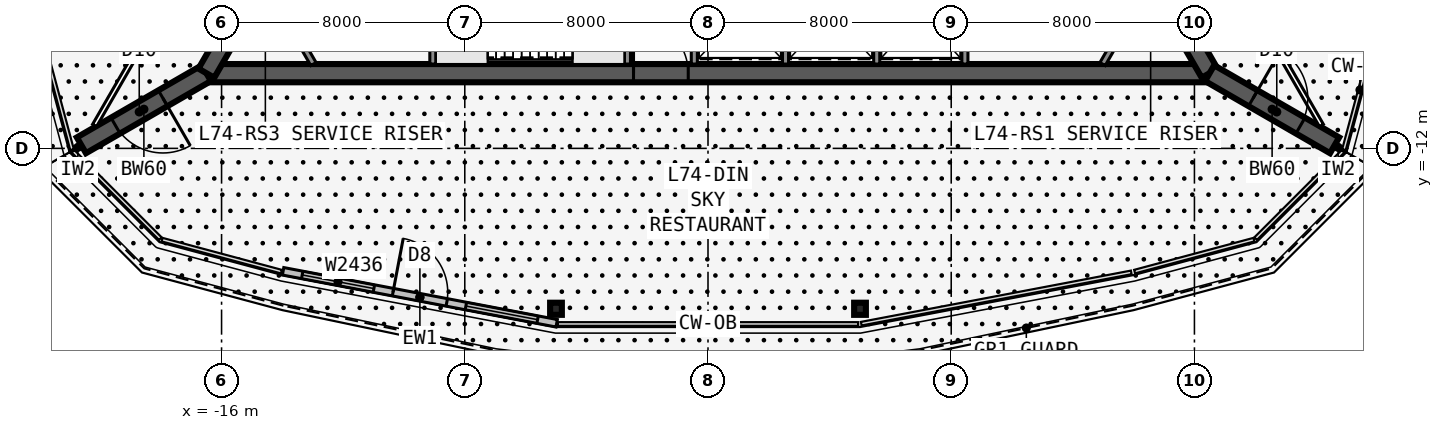
"""IFC4 building model, lengths in metres.
Left out: names, types, materials, properties, quantities, classifications, styles, units other than length and angle.
Written with IfcOpenShell. Run it as: python <this file> out.ifc"""

import sys

from ifc_helpers import new_model, si_unit, direction, frame, frame_2d, origin, origin_2d, place, context, subcontext, project, spatial, rectangle, i_section, extrude, element, fill, save


model = new_model("IFC4")
c1 = context("Model", 3, precision=1e-05, world=origin(), true_north=direction((0.0, 1.0)))
c2 = subcontext(c1, "Body", "Model", "MODEL_VIEW")
j1 = project(units=[si_unit("LENGTHUNIT", "METRE"), si_unit("PLANEANGLEUNIT", "RADIAN")], contexts=[c1])
p1 = place(None, origin())
s1 = spatial("IfcSite", under=j1, at=p1, CompositionType="ELEMENT")
p2 = place(p1, origin())
s2 = spatial("IfcBuilding", under=s1, at=p2, CompositionType="ELEMENT")
p3 = place(p2, frame((0.0, 0.0, 281.3)))
s3 = spatial("IfcBuildingStorey", under=s2, at=p3, CompositionType="ELEMENT", Elevation=281.3)
p4 = place(p3, frame((-16.5, -9.526, 0.0), z_axis=(0.0, 0.0, 1.0), x_axis=(1.0, 0.0, 0.0)))
e1 = element("IfcWall", 1, at=p4, inside=s3, PredefinedType="SHEAR", context=c2, shape_type="SweptSolid", body=[
    extrude(rectangle(XDim=33.0, YDim=0.6, at=frame_2d((16.5, 0.0))), origin(), (0.0, 0.0, 1.0), 5.5),
])
p5 = place(p4, frame((14.05, 0.0, 0.0)))
e2 = element("IfcOpeningElement", 2, at=p5, cuts=e1, PredefinedType="OPENING", context=c2, shape_type="SweptSolid", body=[
    extrude(rectangle(XDim=1.8, YDim=2.13, at=frame_2d((0.9, 1.065))), frame((0.0, 0.31, 0.0), z_axis=(0.0, -1.0, 0.0), x_axis=(1.0, 0.0, 0.0)), (0.0, 0.0, 1.0), 0.62),
])
p6 = place(p3, frame((-9.05, -5.951, 0.0), z_axis=(0.0, 0.0, 1.0), x_axis=(0.0, -1.0, 0.0)))
e3 = element("IfcWall", 3, at=p6, inside=s3, PredefinedType="SOLIDWALL", context=c2, shape_type="SweptSolid", body=[
    extrude(rectangle(XDim=3.275, YDim=0.2, at=frame_2d((1.637, 0.0))), origin(), (0.0, 0.0, 1.0), 5.25),
])
p7 = place(p3, frame((-2.65, -5.951, 0.0), z_axis=(0.0, 0.0, 1.0), x_axis=(0.0, -1.0, 0.0)))
e4 = element("IfcWall", 4, at=p7, inside=s3, PredefinedType="SOLIDWALL", context=c2, shape_type="SweptSolid", body=[
    extrude(rectangle(XDim=3.275, YDim=0.2, at=frame_2d((1.637, 0.0))), origin(), (0.0, 0.0, 1.0), 5.25),
])
p8 = place(p7, frame((1.675, 0.0, 0.0)))
e5 = element("IfcOpeningElement", 5, at=p8, cuts=e4, PredefinedType="OPENING", context=c2, shape_type="SweptSolid", body=[
    extrude(rectangle(XDim=1.0, YDim=2.13, at=frame_2d((0.5, 1.065))), frame((0.0, 0.11, 0.0), z_axis=(0.0, -1.0, 0.0), x_axis=(1.0, 0.0, 0.0)), (0.0, 0.0, 1.0), 0.22),
])
for number, where, z_axis, x_axis in (
    (6, (-0.45, -5.951, 0.0), (0.0, 0.0, 1.0), (0.0, -1.0, 0.0)),
    (7, (2.55, -5.951, 0.0), (0.0, 0.0, 1.0), (0.0, -1.0, 0.0)),
    (8, (5.55, -5.951, 0.0), (0.0, 0.0, 1.0), (0.0, -1.0, 0.0)),
    (9, (8.45, -5.951, 0.0), (0.0, 0.0, 1.0), (0.0, -1.0, 0.0)),
):
    element("IfcWall", number, at=place(p3, frame(where, z_axis=z_axis, x_axis=x_axis)), inside=s3, PredefinedType="SOLIDWALL", context=c2, shape_type="SweptSolid", body=[
        extrude(rectangle(XDim=3.275, YDim=0.2, at=frame_2d((1.637, 0.0))), origin(), (0.0, 0.0, 1.0), 5.25),
    ])
p9 = place(p3, frame((16.5, -9.526, 0.0), z_axis=(0.0, 0.0, 1.0), x_axis=(-0.499999749417, 0.866025548458, 0.0)))
e10 = element("IfcWall", 10, at=p9, inside=s3, PredefinedType="SHEAR", context=c2, shape_type="SweptSolid", body=[
    extrude(rectangle(XDim=33.0, YDim=0.6, at=frame_2d((16.5, 0.0))), origin(), (0.0, 0.0, 1.0), 5.5),
])
p10 = place(p9, frame((14.15, 0.0, 0.0)))
e11 = element("IfcOpeningElement", 11, at=p10, cuts=e10, PredefinedType="OPENING", context=c2, shape_type="SweptSolid", body=[
    extrude(rectangle(XDim=1.8, YDim=2.13, at=frame_2d((0.9, 1.065))), frame((0.0, 0.31, 0.0), z_axis=(0.0, -1.0, 0.0), x_axis=(1.0, 0.0, 0.0)), (0.0, 0.0, 1.0), 0.62),
])
p11 = place(p9, frame((12.6, 0.0, 0.0)))
e12 = element("IfcOpeningElement", 12, at=p11, cuts=e10, PredefinedType="OPENING", context=c2, shape_type="SweptSolid", body=[
    extrude(rectangle(XDim=1.0, YDim=2.13, at=frame_2d((0.5, 1.065))), frame((0.0, 0.31, 0.0), z_axis=(0.0, -1.0, 0.0), x_axis=(1.0, 0.0, 0.0)), (0.0, 0.0, 1.0), 0.62),
])
p12 = place(p3, frame((0.0, 19.052, 0.0), z_axis=(0.0, 0.0, 1.0), x_axis=(-0.499999749417, -0.866025548458, 0.0)))
e13 = element("IfcWall", 13, at=p12, inside=s3, PredefinedType="SHEAR", context=c2, shape_type="SweptSolid", body=[
    extrude(rectangle(XDim=33.0, YDim=0.6, at=frame_2d((16.5, 0.0))), origin(), (0.0, 0.0, 1.0), 5.5),
])
p13 = place(p12, frame((14.15, 0.0, 0.0)))
e14 = element("IfcOpeningElement", 14, at=p13, cuts=e13, PredefinedType="OPENING", context=c2, shape_type="SweptSolid", body=[
    extrude(rectangle(XDim=1.8, YDim=2.13, at=frame_2d((0.9, 1.065))), frame((0.0, 0.31, 0.0), z_axis=(0.0, -1.0, 0.0), x_axis=(1.0, 0.0, 0.0)), (0.0, 0.0, 1.0), 0.62),
])
p14 = place(p12, frame((12.6, 0.0, 0.0)))
e15 = element("IfcOpeningElement", 15, at=p14, cuts=e13, PredefinedType="OPENING", context=c2, shape_type="SweptSolid", body=[
    extrude(rectangle(XDim=1.0, YDim=2.13, at=frame_2d((0.5, 1.065))), frame((0.0, 0.31, 0.0), z_axis=(0.0, -1.0, 0.0), x_axis=(1.0, 0.0, 0.0)), (0.0, 0.0, 1.0), 0.62),
])
p15 = place(p3, frame((16.5, -9.526, 0.0), z_axis=(0.0, 0.0, 1.0), x_axis=(0.866031398331, -0.499989616998, 0.0)))
e16 = element("IfcWall", 16, at=p15, inside=s3, PredefinedType="SHEAR", context=c2, shape_type="SweptSolid", body=[
    extrude(rectangle(XDim=4.746, YDim=0.6, at=frame_2d((2.373, 0.0))), origin(), (0.0, 0.0, 1.0), 5.5),
])
p16 = place(p15, frame((1.65, 0.0, 0.0)))
e17 = element("IfcOpeningElement", 17, at=p16, cuts=e16, PredefinedType="OPENING", context=c2, shape_type="SweptSolid", body=[
    extrude(rectangle(XDim=1.8, YDim=2.13, at=frame_2d((0.9, 1.065))), frame((0.0, 0.31, 0.0), z_axis=(0.0, -1.0, 0.0), x_axis=(1.0, 0.0, 0.0)), (0.0, 0.0, 1.0), 0.62),
])
p17 = place(p3, frame((-16.5, -9.526, 0.0), z_axis=(0.0, 0.0, 1.0), x_axis=(-0.866031398331, -0.499989616998, 0.0)))
e18 = element("IfcWall", 18, at=p17, inside=s3, PredefinedType="SHEAR", context=c2, shape_type="SweptSolid", body=[
    extrude(rectangle(XDim=4.746, YDim=0.6, at=frame_2d((2.373, 0.0))), origin(), (0.0, 0.0, 1.0), 5.5),
])
p18 = place(p17, frame((1.65, 0.0, 0.0)))
e19 = element("IfcOpeningElement", 19, at=p18, cuts=e18, PredefinedType="OPENING", context=c2, shape_type="SweptSolid", body=[
    extrude(rectangle(XDim=1.8, YDim=2.13, at=frame_2d((0.9, 1.065))), frame((0.0, 0.31, 0.0), z_axis=(0.0, -1.0, 0.0), x_axis=(1.0, 0.0, 0.0)), (0.0, 0.0, 1.0), 0.62),
])
for number, where, z_axis, x_axis in (
    (20, (-5.0, -17.276, 0.0), (0.0, 0.0, 1.0), (0.0, -1.0, 0.0)),
    (21, (5.0, -17.276, 0.0), (0.0, 0.0, 1.0), (0.0, -1.0, 0.0)),
):
    element("IfcColumn", number, at=place(p3, frame(where, z_axis=z_axis, x_axis=x_axis)), inside=s3, PredefinedType="COLUMN", context=c2, shape_type="SweptSolid", body=[
        extrude(i_section(OverallWidth=0.399, OverallDepth=0.386, WebThickness=0.021, FlangeThickness=0.033, at=origin_2d()), origin(), (0.0, 0.0, 1.0), 5.5),
    ])
p19 = place(p3, frame((-13.977, -16.043, 0.0), z_axis=(0.0, 0.0, 1.0), x_axis=(0.982425233625, -0.18665653039, 0.0)))
e22 = element("IfcWall", 22, at=p19, inside=s3, PredefinedType="STANDARD", context=c2, shape_type="SweptSolid", body=[
    extrude(rectangle(XDim=9.161, YDim=0.25, at=frame_2d((4.581, 0.0))), origin(), (0.0, 0.0, 1.0), 5.25),
])
p20 = place(p19, frame((3.68, 0.0, 0.0)))
e23 = element("IfcOpeningElement", 23, at=p20, cuts=e22, PredefinedType="OPENING", context=c2, shape_type="SweptSolid", body=[
    extrude(rectangle(XDim=1.8, YDim=2.4, at=frame_2d((0.9, 1.2))), frame((0.0, 0.135, 0.0), z_axis=(0.0, -1.0, 0.0), x_axis=(1.0, 0.0, 0.0)), (0.0, 0.0, 1.0), 0.27),
])
p21 = place(p19, frame((0.64, 0.0, 0.6)))
e24 = element("IfcOpeningElement", 24, at=p21, cuts=e22, PredefinedType="OPENING", context=c2, shape_type="SweptSolid", body=[
    extrude(rectangle(XDim=2.4, YDim=3.6, at=frame_2d((1.2, 1.8))), frame((0.0, 0.135, 0.0), z_axis=(0.0, -1.0, 0.0), x_axis=(1.0, 0.0, 0.0)), (0.0, 0.0, 1.0), 0.27),
])
p22 = place(p19, frame((6.121, 0.0, 0.6)))
e25 = element("IfcOpeningElement", 25, at=p22, cuts=e22, PredefinedType="OPENING", context=c2, shape_type="SweptSolid", body=[
    extrude(rectangle(XDim=2.4, YDim=3.6, at=frame_2d((1.2, 1.8))), frame((0.0, 0.135, 0.0), z_axis=(0.0, -1.0, 0.0), x_axis=(1.0, 0.0, 0.0)), (0.0, 0.0, 1.0), 0.27),
])
p23 = place(p3, frame((20.177, -11.245, 0.0), z_axis=(0.0, 0.0, 1.0), x_axis=(-0.499998875317, 0.866026053119, 0.0)))
e26 = element("IfcWall", 26, at=p23, inside=s3, PredefinedType="PARTITIONING", context=c2, shape_type="SweptSolid", body=[
    extrude(rectangle(XDim=39.654, YDim=0.15, at=frame_2d((19.827, 0.0))), origin(), (0.0, 0.0, 1.0), 5.25),
])
p24 = place(p23, frame((9.164, 0.0, 0.0)))
e27 = element("IfcOpeningElement", 27, at=p24, cuts=e26, PredefinedType="OPENING", context=c2, shape_type="SweptSolid", body=[
    extrude(rectangle(XDim=1.8, YDim=2.13, at=frame_2d((0.9, 1.065))), frame((0.0, 0.085, 0.0), z_axis=(0.0, -1.0, 0.0), x_axis=(1.0, 0.0, 0.0)), (0.0, 0.0, 1.0), 0.17),
])
p25 = place(p23, frame((28.69, 0.0, 0.0)))
e28 = element("IfcOpeningElement", 28, at=p25, cuts=e26, PredefinedType="OPENING", context=c2, shape_type="SweptSolid", body=[
    extrude(rectangle(XDim=1.8, YDim=2.13, at=frame_2d((0.9, 1.065))), frame((0.0, 0.085, 0.0), z_axis=(0.0, -1.0, 0.0), x_axis=(1.0, 0.0, 0.0)), (0.0, 0.0, 1.0), 0.17),
])
p26 = place(p3, frame((-0.35, 23.096, 0.0), z_axis=(0.0, 0.0, 1.0), x_axis=(-0.499998875317, -0.866026053119, 0.0)))
e29 = element("IfcWall", 29, at=p26, inside=s3, PredefinedType="PARTITIONING", context=c2, shape_type="SweptSolid", body=[
    extrude(rectangle(XDim=39.654, YDim=0.15, at=frame_2d((19.827, 0.0))), origin(), (0.0, 0.0, 1.0), 5.25),
])
p27 = place(p26, frame((8.063, 0.0, 0.0)))
e30 = element("IfcOpeningElement", 30, at=p27, cuts=e29, PredefinedType="OPENING", context=c2, shape_type="SweptSolid", body=[
    extrude(rectangle(XDim=1.0, YDim=2.13, at=frame_2d((0.5, 1.065))), frame((0.0, 0.085, 0.0), z_axis=(0.0, -1.0, 0.0), x_axis=(1.0, 0.0, 0.0)), (0.0, 0.0, 1.0), 0.17),
])
p28 = place(p26, frame((17.827, 0.0, 0.0)))
e31 = element("IfcOpeningElement", 31, at=p28, cuts=e29, PredefinedType="OPENING", context=c2, shape_type="SweptSolid", body=[
    extrude(rectangle(XDim=1.0, YDim=2.13, at=frame_2d((0.5, 1.065))), frame((0.0, 0.085, 0.0), z_axis=(0.0, -1.0, 0.0), x_axis=(1.0, 0.0, 0.0)), (0.0, 0.0, 1.0), 0.17),
])
p29 = place(p26, frame((20.827, 0.0, 0.0)))
e32 = element("IfcOpeningElement", 32, at=p29, cuts=e29, PredefinedType="OPENING", context=c2, shape_type="SweptSolid", body=[
    extrude(rectangle(XDim=1.0, YDim=2.13, at=frame_2d((0.5, 1.065))), frame((0.0, 0.085, 0.0), z_axis=(0.0, -1.0, 0.0), x_axis=(1.0, 0.0, 0.0)), (0.0, 0.0, 1.0), 0.17),
])
p30 = place(p26, frame((30.591, 0.0, 0.0)))
e33 = element("IfcOpeningElement", 33, at=p30, cuts=e29, PredefinedType="OPENING", context=c2, shape_type="SweptSolid", body=[
    extrude(rectangle(XDim=1.0, YDim=2.13, at=frame_2d((0.5, 1.065))), frame((0.0, 0.085, 0.0), z_axis=(0.0, -1.0, 0.0), x_axis=(1.0, 0.0, 0.0)), (0.0, 0.0, 1.0), 0.17),
])
for number, where, z_axis, x_axis in (
    (34, (20.61, -11.899, 0.0), (0.0, 0.0, 1.0), (0.866, -0.5, 0.0)),
    (35, (-20.61, -11.899, 0.0), (0.0, 0.0, 1.0), (-0.866, -0.5, 0.0)),
):
    element("IfcWall", number, at=place(p3, frame(where, z_axis=z_axis, x_axis=x_axis)), inside=s3, PredefinedType="PARTITIONING", context=c2, shape_type="SweptSolid", body=[
        extrude(rectangle(XDim=0.27, YDim=0.15, at=frame_2d((0.135, 0.0))), origin(), (0.0, 0.0, 1.0), 5.25),
    ])
for number, where, z_axis, x_axis in (
    (36, (14.479, -6.626, 0.0), (0.0, 0.0, 1.0), (-0.5, -0.866, 0.0)),
    (37, (-12.978, -9.226, 0.0), (0.0, 0.0, 1.0), (-0.5, 0.866, 0.0)),
):
    element("IfcWall", number, at=place(p3, frame(where, z_axis=z_axis, x_axis=x_axis)), inside=s3, PredefinedType="SOLIDWALL", context=c2, shape_type="SweptSolid", body=[
        extrude(rectangle(XDim=3.002, YDim=0.2, at=frame_2d((1.501, 0.0))), origin(), (0.0, 0.0, 1.0), 5.25),
    ])
p31 = place(p20, origin())
e38 = element("IfcDoor", 38, at=p31, inside=s3, OperationType="DOUBLE_DOOR_SINGLE_SWING", PredefinedType="DOOR", context=c2, shape_type="SweptSolid", body=[
    extrude(rectangle(XDim=1.8, YDim=2.4, at=frame_2d((0.9, 1.2))), frame((0.0, 0.025, 0.0), z_axis=(0.0, -1.0, 0.0), x_axis=(1.0, 0.0, 0.0)), (0.0, 0.0, 1.0), 0.05),
])
fill(e23, e38)
p32 = place(p21, origin())
e39 = element("IfcWindow", 39, at=p32, inside=s3, PartitioningType="SINGLE_PANEL", PredefinedType="WINDOW", context=c2, shape_type="SweptSolid", body=[
    extrude(rectangle(XDim=2.4, YDim=3.6, at=frame_2d((1.2, 1.8))), frame((0.0, 0.03, 0.0), z_axis=(0.0, -1.0, 0.0), x_axis=(1.0, 0.0, 0.0)), (0.0, 0.0, 1.0), 0.06),
])
fill(e24, e39)
p33 = place(p22, origin())
e40 = element("IfcWindow", 40, at=p33, inside=s3, PartitioningType="SINGLE_PANEL", PredefinedType="WINDOW", context=c2, shape_type="SweptSolid", body=[
    extrude(rectangle(XDim=2.4, YDim=3.6, at=frame_2d((1.2, 1.8))), frame((0.0, 0.03, 0.0), z_axis=(0.0, -1.0, 0.0), x_axis=(1.0, 0.0, 0.0)), (0.0, 0.0, 1.0), 0.06),
])
fill(e25, e40)
p34 = place(p5, origin())
e41 = element("IfcDoor", 41, at=p34, inside=s3, OperationType="DOUBLE_DOOR_SINGLE_SWING", PredefinedType="DOOR", context=c2, shape_type="SweptSolid", body=[
    extrude(rectangle(XDim=1.8, YDim=2.13, at=frame_2d((0.9, 1.065))), frame((0.0, 0.025, 0.0), z_axis=(0.0, -1.0, 0.0), x_axis=(1.0, 0.0, 0.0)), (0.0, 0.0, 1.0), 0.05),
])
fill(e2, e41)
p35 = place(p16, origin())
e42 = element("IfcDoor", 42, at=p35, inside=s3, OperationType="DOUBLE_DOOR_DOUBLE_SWING", PredefinedType="DOOR", context=c2, shape_type="SweptSolid", body=[
    extrude(rectangle(XDim=1.8, YDim=2.13, at=frame_2d((0.9, 1.065))), frame((0.0, 0.025, 0.0), z_axis=(0.0, -1.0, 0.0), x_axis=(1.0, 0.0, 0.0)), (0.0, 0.0, 1.0), 0.05),
])
fill(e17, e42)
p36 = place(p18, origin())
e43 = element("IfcDoor", 43, at=p36, inside=s3, OperationType="DOUBLE_DOOR_DOUBLE_SWING", PredefinedType="DOOR", context=c2, shape_type="SweptSolid", body=[
    extrude(rectangle(XDim=1.8, YDim=2.13, at=frame_2d((0.9, 1.065))), frame((0.0, 0.025, 0.0), z_axis=(0.0, -1.0, 0.0), x_axis=(1.0, 0.0, 0.0)), (0.0, 0.0, 1.0), 0.05),
])
fill(e19, e43)
save(model, sys.argv[1])
